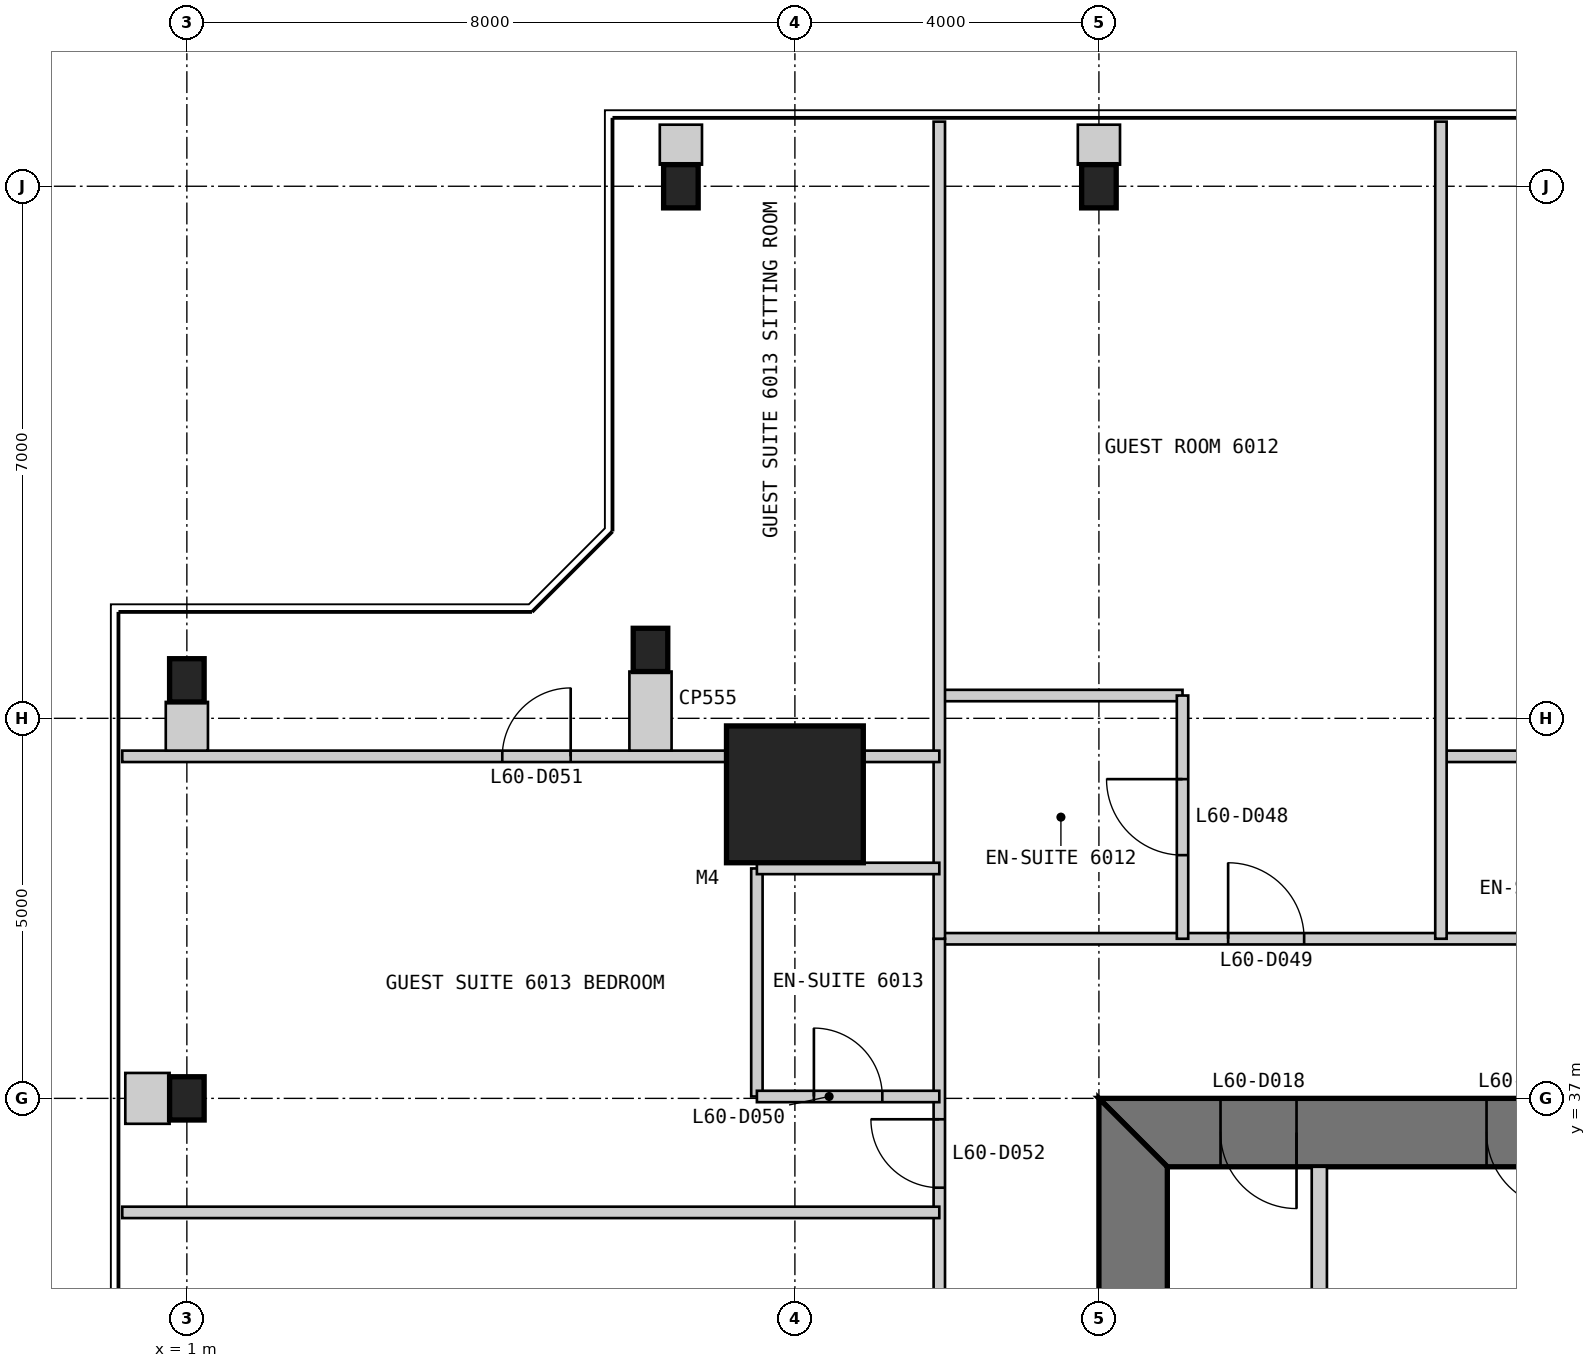
"""IFC4 building model, lengths in metres.
Left out: names, types, materials, properties, quantities, classifications, styles, units other than length and angle.
Written with IfcOpenShell. Run it as: python <this file> out.ifc"""

import sys

from ifc_helpers import new_model, si_unit, direction, frame, frame_2d, origin, origin_2d, place, context, subcontext, project, spatial, polyline, rectangle, i_section, outline, extrude, element, fill, save


model = new_model("IFC4")
c1 = context("Model", 3, precision=1e-05, world=origin(), true_north=direction((0.0, 1.0)))
c2 = subcontext(c1, "Body", "Model", "MODEL_VIEW")
j1 = project(units=[si_unit("LENGTHUNIT", "METRE"), si_unit("PLANEANGLEUNIT", "RADIAN")], contexts=[c1])
p1 = place(None, origin())
s1 = spatial("IfcSite", under=j1, at=p1, CompositionType="ELEMENT")
p2 = place(p1, origin())
s2 = spatial("IfcBuilding", under=s1, at=p2, CompositionType="ELEMENT")
p3 = place(p2, frame((0.0, 0.0, 256.0)))
s3 = spatial("IfcBuildingStorey", under=s2, at=p3, CompositionType="ELEMENT", Elevation=256.0)
p4 = place(p3, frame((9.0, 41.0, 0.0), z_axis=(0.0, 0.0, 1.0), x_axis=(1.0, 0.0, 0.0)))
e1 = element("IfcColumn", 1, at=p4, inside=s3, PredefinedType="COLUMN", context=c2, shape_type="SweptSolid", body=[
    extrude(rectangle(XDim=1.8, YDim=1.8, at=origin_2d()), origin(), (0.0, 0.0, 1.0), 3.4),
])
for number, where, z_axis, x_axis in (
    (2, (13.0, 49.0, 0.0), (0.0, 0.0, 1.0), (1.0, 0.0, 0.0)),
    (3, (7.5, 49.0, 0.0), (0.0, 0.0, 1.0), (1.0, 0.0, 0.0)),
    (4, (7.1, 42.9, 0.0), (0.0, 0.0, 1.0), (1.0, 0.0, 0.0)),
    (5, (1.0, 42.5, 0.0), (0.0, 0.0, 1.0), (1.0, 0.0, 0.0)),
    (6, (1.0, 37.0, 0.0), (0.0, 0.0, 1.0), (1.0, 0.0, 0.0)),
):
    element("IfcColumn", number, at=place(p3, frame(where, z_axis=z_axis, x_axis=x_axis)), inside=s3, PredefinedType="COLUMN", context=c2, shape_type="SweptSolid", body=[
        extrude(i_section(OverallWidth=0.455, OverallDepth=0.569, WebThickness=0.078, FlangeThickness=0.125, at=origin_2d()), origin(), (0.0, 0.0, 1.0), 3.4),
    ])
p5 = place(p3, frame((37.0, 36.55, 0.0), z_axis=(0.0, 0.0, 1.0), x_axis=(-1.0, 0.0, 0.0)))
e7 = element("IfcWall", 7, at=p5, inside=s3, PredefinedType="SHEAR", context=c2, shape_type="SweptSolid", body=[
    extrude(outline(polyline([(0.0, -0.45), (24.0, -0.45), (23.1, 0.45), (0.9, 0.45), (0.0, -0.45)])), origin(), (0.0, 0.0, 1.0), 3.4),
])
p6 = place(p5, frame((4.9, 0.0, 0.0)))
e8 = element("IfcOpeningElement", 8, at=p6, cuts=e7, PredefinedType="OPENING", context=c2, shape_type="SweptSolid", body=[
    extrude(rectangle(XDim=1.0, YDim=2.2, at=frame_2d((0.5, 1.1))), frame((0.0, 0.46, 0.0), z_axis=(0.0, -1.0, 0.0), x_axis=(1.0, 0.0, 0.0)), (0.0, 0.0, 1.0), 0.92),
])
p7 = place(p5, frame((8.9, 0.0, 0.0)))
e9 = element("IfcOpeningElement", 9, at=p7, cuts=e7, PredefinedType="OPENING", context=c2, shape_type="SweptSolid", body=[
    extrude(rectangle(XDim=1.1, YDim=2.2, at=frame_2d((0.55, 1.1))), frame((0.0, 0.46, 0.0), z_axis=(0.0, -1.0, 0.0), x_axis=(1.0, 0.0, 0.0)), (0.0, 0.0, 1.0), 0.92),
])
p8 = place(p5, frame((15.05, 0.0, 0.0)))
e10 = element("IfcOpeningElement", 10, at=p8, cuts=e7, PredefinedType="OPENING", context=c2, shape_type="SweptSolid", body=[
    extrude(rectangle(XDim=0.9, YDim=2.2, at=frame_2d((0.45, 1.1))), frame((0.0, 0.46, 0.0), z_axis=(0.0, -1.0, 0.0), x_axis=(1.0, 0.0, 0.0)), (0.0, 0.0, 1.0), 0.92),
])
p9 = place(p5, frame((17.9, 0.0, 0.0)))
e11 = element("IfcOpeningElement", 11, at=p9, cuts=e7, PredefinedType="OPENING", context=c2, shape_type="SweptSolid", body=[
    extrude(rectangle(XDim=1.0, YDim=2.2, at=frame_2d((0.5, 1.1))), frame((0.0, 0.46, 0.0), z_axis=(0.0, -1.0, 0.0), x_axis=(1.0, 0.0, 0.0)), (0.0, 0.0, 1.0), 0.92),
])
p10 = place(p5, frame((21.4, 0.0, 0.0)))
e12 = element("IfcOpeningElement", 12, at=p10, cuts=e7, PredefinedType="OPENING", context=c2, shape_type="SweptSolid", body=[
    extrude(rectangle(XDim=1.0, YDim=2.2, at=frame_2d((0.5, 1.1))), frame((0.0, 0.46, 0.0), z_axis=(0.0, -1.0, 0.0), x_axis=(1.0, 0.0, 0.0)), (0.0, 0.0, 1.0), 0.92),
])
p11 = place(p3, frame((13.45, 36.1, 0.0), z_axis=(0.0, 0.0, 1.0), x_axis=(0.0, -1.0, 0.0)))
e13 = element("IfcWall", 13, at=p11, inside=s3, PredefinedType="SHEAR", context=c2, shape_type="SweptSolid", body=[
    extrude(outline(polyline([(-0.9, -0.45), (23.1, -0.45), (22.2, 0.45), (0.0, 0.45), (-0.9, -0.45)])), origin(), (0.0, 0.0, 1.0), 3.4),
])
p12 = place(p11, frame((20.2, 0.0, 0.0)))
e14 = element("IfcOpeningElement", 14, at=p12, cuts=e13, PredefinedType="OPENING", context=c2, shape_type="SweptSolid", body=[
    extrude(rectangle(XDim=1.0, YDim=2.2, at=frame_2d((0.5, 1.1))), frame((0.0, 0.46, 0.0), z_axis=(0.0, -1.0, 0.0), x_axis=(1.0, 0.0, 0.0)), (0.0, 0.0, 1.0), 0.92),
])
p13 = place(p11, frame((17.25, 0.0, 0.0)))
e15 = element("IfcOpeningElement", 15, at=p13, cuts=e13, PredefinedType="OPENING", context=c2, shape_type="SweptSolid", body=[
    extrude(rectangle(XDim=0.9, YDim=2.2, at=frame_2d((0.45, 1.1))), frame((0.0, 0.46, 0.0), z_axis=(0.0, -1.0, 0.0), x_axis=(1.0, 0.0, 0.0)), (0.0, 0.0, 1.0), 0.92),
])
p14 = place(p3, frame((15.9, 36.1, 0.0), z_axis=(0.0, 0.0, 1.0), x_axis=(0.0, -1.0, 0.0)))
e16 = element("IfcWall", 16, at=p14, inside=s3, PredefinedType="PARTITIONING", context=c2, shape_type="SweptSolid", body=[
    extrude(rectangle(XDim=6.1, YDim=0.2, at=frame_2d((3.05, 0.0))), origin(), (0.0, 0.0, 1.0), 3.2),
])
p15 = place(p3, frame((39.1, 39.1, 0.0), z_axis=(0.0, 0.0, 1.0), x_axis=(-1.0, 0.0, 0.0)))
e17 = element("IfcWall", 17, at=p15, inside=s3, PredefinedType="PARTITIONING", context=c2, shape_type="SweptSolid", body=[
    extrude(rectangle(XDim=28.2, YDim=0.15, at=frame_2d((14.1, 0.0))), origin(), (0.0, 0.0, 1.0), 3.25),
])
p16 = place(p15, frame((2.375, 0.0, 0.0)))
e18 = element("IfcOpeningElement", 18, at=p16, cuts=e17, PredefinedType="OPENING", context=c2, shape_type="SweptSolid", body=[
    extrude(rectangle(XDim=0.9, YDim=2.1, at=frame_2d((0.45, 1.05))), frame((0.0, 0.085, 0.0), z_axis=(0.0, -1.0, 0.0), x_axis=(1.0, 0.0, 0.0)), (0.0, 0.0, 1.0), 0.17),
])
p17 = place(p15, frame((10.7, 0.0, 0.0)))
e19 = element("IfcOpeningElement", 19, at=p17, cuts=e17, PredefinedType="OPENING", context=c2, shape_type="SweptSolid", body=[
    extrude(rectangle(XDim=0.9, YDim=2.1, at=frame_2d((0.45, 1.05))), frame((0.0, 0.085, 0.0), z_axis=(0.0, -1.0, 0.0), x_axis=(1.0, 0.0, 0.0)), (0.0, 0.0, 1.0), 0.17),
])
p18 = place(p15, frame((17.1, 0.0, 0.0)))
e20 = element("IfcOpeningElement", 20, at=p18, cuts=e17, PredefinedType="OPENING", context=c2, shape_type="SweptSolid", body=[
    extrude(rectangle(XDim=0.9, YDim=2.1, at=frame_2d((0.45, 1.05))), frame((0.0, 0.085, 0.0), z_axis=(0.0, -1.0, 0.0), x_axis=(1.0, 0.0, 0.0)), (0.0, 0.0, 1.0), 0.17),
])
p19 = place(p15, frame((23.4, 0.0, 0.0)))
e21 = element("IfcOpeningElement", 21, at=p19, cuts=e17, PredefinedType="OPENING", context=c2, shape_type="SweptSolid", body=[
    extrude(rectangle(XDim=1.0, YDim=2.1, at=frame_2d((0.5, 1.05))), frame((0.0, 0.085, 0.0), z_axis=(0.0, -1.0, 0.0), x_axis=(1.0, 0.0, 0.0)), (0.0, 0.0, 1.0), 0.17),
])
p20 = place(p3, frame((20.5, 41.5, 0.0), z_axis=(0.0, 0.0, 1.0), x_axis=(-1.0, 0.0, 0.0)))
e22 = element("IfcWall", 22, at=p20, inside=s3, PredefinedType="PARTITIONING", context=c2, shape_type="SweptSolid", body=[
    extrude(rectangle(XDim=3.0, YDim=0.15, at=frame_2d((1.5, 0.0))), origin(), (0.0, 0.0, 1.0), 3.25),
])
p21 = place(p3, frame((17.5, 49.85, 0.0), z_axis=(0.0, 0.0, 1.0), x_axis=(0.0, -1.0, 0.0)))
e23 = element("IfcWall", 23, at=p21, inside=s3, PredefinedType="PARTITIONING", context=c2, shape_type="SweptSolid", body=[
    extrude(rectangle(XDim=10.75, YDim=0.15, at=frame_2d((5.375, 0.0))), origin(), (0.0, 0.0, 1.0), 3.25),
])
p22 = place(p3, frame((14.1, 42.3, 0.0), z_axis=(0.0, 0.0, 1.0), x_axis=(-1.0, 0.0, 0.0)))
e24 = element("IfcWall", 24, at=p22, inside=s3, PredefinedType="PARTITIONING", context=c2, shape_type="SweptSolid", body=[
    extrude(rectangle(XDim=3.2, YDim=0.15, at=frame_2d((1.6, 0.0))), origin(), (0.0, 0.0, 1.0), 3.25),
])
p23 = place(p3, frame((14.1, 42.3, 0.0), z_axis=(0.0, 0.0, 1.0), x_axis=(0.0, -1.0, 0.0)))
e25 = element("IfcWall", 25, at=p23, inside=s3, PredefinedType="PARTITIONING", context=c2, shape_type="SweptSolid", body=[
    extrude(rectangle(XDim=3.2, YDim=0.15, at=frame_2d((1.6, 0.0))), origin(), (0.0, 0.0, 1.0), 3.25),
])
p24 = place(p23, frame((1.1, 0.0, 0.0)))
e26 = element("IfcOpeningElement", 26, at=p24, cuts=e25, PredefinedType="OPENING", context=c2, shape_type="SweptSolid", body=[
    extrude(rectangle(XDim=1.0, YDim=2.1, at=frame_2d((0.5, 1.05))), frame((0.0, 0.085, 0.0), z_axis=(0.0, -1.0, 0.0), x_axis=(1.0, 0.0, 0.0)), (0.0, 0.0, 1.0), 0.17),
])
p25 = place(p3, frame((10.9, 39.1, 0.0), z_axis=(0.0, 0.0, 1.0), x_axis=(0.0, -1.0, 0.0)))
e27 = element("IfcWall", 27, at=p25, inside=s3, PredefinedType="PARTITIONING", context=c2, shape_type="SweptSolid", body=[
    extrude(rectangle(XDim=28.2, YDim=0.15, at=frame_2d((14.1, 0.0))), origin(), (0.0, 0.0, 1.0), 3.25),
])
p26 = place(p25, frame((2.375, 0.0, 0.0)))
e28 = element("IfcOpeningElement", 28, at=p26, cuts=e27, PredefinedType="OPENING", context=c2, shape_type="SweptSolid", body=[
    extrude(rectangle(XDim=0.9, YDim=2.1, at=frame_2d((0.45, 1.05))), frame((0.0, 0.085, 0.0), z_axis=(0.0, -1.0, 0.0), x_axis=(1.0, 0.0, 0.0)), (0.0, 0.0, 1.0), 0.17),
])
p27 = place(p25, frame((10.7, 0.0, 0.0)))
e29 = element("IfcOpeningElement", 29, at=p27, cuts=e27, PredefinedType="OPENING", context=c2, shape_type="SweptSolid", body=[
    extrude(rectangle(XDim=0.9, YDim=2.1, at=frame_2d((0.45, 1.05))), frame((0.0, 0.085, 0.0), z_axis=(0.0, -1.0, 0.0), x_axis=(1.0, 0.0, 0.0)), (0.0, 0.0, 1.0), 0.17),
])
p28 = place(p25, frame((17.1, 0.0, 0.0)))
e30 = element("IfcOpeningElement", 30, at=p28, cuts=e27, PredefinedType="OPENING", context=c2, shape_type="SweptSolid", body=[
    extrude(rectangle(XDim=0.9, YDim=2.1, at=frame_2d((0.45, 1.05))), frame((0.0, 0.085, 0.0), z_axis=(0.0, -1.0, 0.0), x_axis=(1.0, 0.0, 0.0)), (0.0, 0.0, 1.0), 0.17),
])
p29 = place(p25, frame((23.7, 0.0, 0.0)))
e31 = element("IfcOpeningElement", 31, at=p29, cuts=e27, PredefinedType="OPENING", context=c2, shape_type="SweptSolid", body=[
    extrude(rectangle(XDim=0.9, YDim=2.1, at=frame_2d((0.45, 1.05))), frame((0.0, 0.085, 0.0), z_axis=(0.0, -1.0, 0.0), x_axis=(1.0, 0.0, 0.0)), (0.0, 0.0, 1.0), 0.17),
])
p30 = place(p3, frame((10.9, 49.85, 0.0), z_axis=(0.0, 0.0, 1.0), x_axis=(0.0, -1.0, 0.0)))
e32 = element("IfcWall", 32, at=p30, inside=s3, PredefinedType="PARTITIONING", context=c2, shape_type="SweptSolid", body=[
    extrude(rectangle(XDim=10.75, YDim=0.15, at=frame_2d((5.375, 0.0))), origin(), (0.0, 0.0, 1.0), 3.25),
])
p31 = place(p3, frame((8.5, 40.025, 0.0), z_axis=(0.0, 0.0, 1.0), x_axis=(0.0, -1.0, 0.0)))
e33 = element("IfcWall", 33, at=p31, inside=s3, PredefinedType="PARTITIONING", context=c2, shape_type="SweptSolid", body=[
    extrude(rectangle(XDim=3.0, YDim=0.15, at=frame_2d((1.5, 0.0))), origin(), (0.0, 0.0, 1.0), 3.25),
])
p32 = place(p3, frame((8.5, 37.025, 0.0), z_axis=(0.0, 0.0, 1.0), x_axis=(1.0, 0.0, 0.0)))
e34 = element("IfcWall", 34, at=p32, inside=s3, PredefinedType="PARTITIONING", context=c2, shape_type="SweptSolid", body=[
    extrude(rectangle(XDim=2.4, YDim=0.15, at=frame_2d((1.2, 0.0))), origin(), (0.0, 0.0, 1.0), 2.404),
])
p33 = place(p32, frame((0.75, 0.0, 0.0)))
e35 = element("IfcOpeningElement", 35, at=p33, cuts=e34, PredefinedType="OPENING", context=c2, shape_type="SweptSolid", body=[
    extrude(rectangle(XDim=0.9, YDim=2.1, at=frame_2d((0.45, 1.05))), frame((0.0, 0.085, 0.0), z_axis=(0.0, -1.0, 0.0), x_axis=(1.0, 0.0, 0.0)), (0.0, 0.0, 1.0), 0.17),
])
p34 = place(p3, frame((8.5, 40.025, 0.0), z_axis=(0.0, 0.0, 1.0), x_axis=(1.0, 0.0, 0.0)))
e36 = element("IfcWall", 36, at=p34, inside=s3, PredefinedType="PARTITIONING", context=c2, shape_type="SweptSolid", body=[
    extrude(rectangle(XDim=2.4, YDim=0.15, at=frame_2d((1.2, 0.0))), origin(), (0.0, 0.0, 1.0), 3.25),
])
p35 = place(p3, frame((0.15, 41.5, 0.0), z_axis=(0.0, 0.0, 1.0), x_axis=(1.0, 0.0, 0.0)))
e37 = element("IfcWall", 37, at=p35, inside=s3, PredefinedType="PARTITIONING", context=c2, shape_type="SweptSolid", body=[
    extrude(rectangle(XDim=10.75, YDim=0.15, at=frame_2d((5.375, 0.0))), origin(), (0.0, 0.0, 1.0), 3.25),
])
p36 = place(p35, frame((5.0, 0.0, 0.0)))
e38 = element("IfcOpeningElement", 38, at=p36, cuts=e37, PredefinedType="OPENING", context=c2, shape_type="SweptSolid", body=[
    extrude(rectangle(XDim=0.9, YDim=2.1, at=frame_2d((0.45, 1.05))), frame((0.0, 0.085, 0.0), z_axis=(0.0, -1.0, 0.0), x_axis=(1.0, 0.0, 0.0)), (0.0, 0.0, 1.0), 0.17),
])
p37 = place(p3, frame((0.15, 35.5, 0.0), z_axis=(0.0, 0.0, 1.0), x_axis=(1.0, 0.0, 0.0)))
e39 = element("IfcWall", 39, at=p37, inside=s3, PredefinedType="PARTITIONING", context=c2, shape_type="SweptSolid", body=[
    extrude(rectangle(XDim=10.75, YDim=0.15, at=frame_2d((5.375, 0.0))), origin(), (0.0, 0.0, 1.0), 3.25),
])
for number, where, z_axis, x_axis in (
    (40, (13.0, 49.81, 0.0), (0.0, 0.0, 1.0), (0.0, -1.0, 0.0)),
    (41, (7.5, 49.81, 0.0), (0.0, 0.0, 1.0), (0.0, -1.0, 0.0)),
):
    element("IfcWall", number, at=place(p3, frame(where, z_axis=z_axis, x_axis=x_axis)), inside=s3, PredefinedType="PARTITIONING", context=c2, shape_type="SweptSolid", body=[
        extrude(rectangle(XDim=0.526, YDim=0.555, at=frame_2d((0.263, 0.0))), origin(), (0.0, 0.0, 1.0), 3.25),
    ])
p38 = place(p3, frame((7.1, 41.575, 0.0), z_axis=(0.0, 0.0, 1.0), x_axis=(0.0, 1.0, 0.0)))
e42 = element("IfcWall", 42, at=p38, inside=s3, PredefinedType="PARTITIONING", context=c2, shape_type="SweptSolid", body=[
    extrude(rectangle(XDim=1.041, YDim=0.555, at=frame_2d((0.52, 0.0))), origin(), (0.0, 0.0, 1.0), 3.25),
])
p39 = place(p3, frame((1.0, 41.575, 0.0), z_axis=(0.0, 0.0, 1.0), x_axis=(0.0, 1.0, 0.0)))
e43 = element("IfcWall", 43, at=p39, inside=s3, PredefinedType="PARTITIONING", context=c2, shape_type="SweptSolid", body=[
    extrude(rectangle(XDim=0.641, YDim=0.555, at=frame_2d((0.32, 0.0))), origin(), (0.0, 0.0, 1.0), 2.338),
])
p40 = place(p3, frame((0.19, 37.0, 0.0), z_axis=(0.0, 0.0, 1.0), x_axis=(1.0, 0.0, 0.0)))
e44 = element("IfcWall", 44, at=p40, inside=s3, PredefinedType="PARTITIONING", context=c2, shape_type="SweptSolid", body=[
    extrude(rectangle(XDim=0.583, YDim=0.669, at=frame_2d((0.292, 0.0))), origin(), (0.0, 0.0, 1.0), 3.25),
])
p41 = place(p9, origin())
e45 = element("IfcDoor", 45, at=p41, inside=s3, OperationType="SINGLE_SWING_LEFT", PredefinedType="DOOR", context=c2, shape_type="SweptSolid", body=[
    extrude(rectangle(XDim=1.0, YDim=2.2, at=frame_2d((0.5, 1.1))), frame((0.0, 0.025, 0.0), z_axis=(0.0, -1.0, 0.0), x_axis=(1.0, 0.0, 0.0)), (0.0, 0.0, 1.0), 0.05),
    extrude(outline(polyline([(0.0, 0.0), (0.04, 0.0), (0.04, 2.16), (0.96, 2.16), (0.96, 0.0), (1.0, 0.0), (1.0, 2.2), (0.0, 2.2), (0.0, 0.0)])), frame((0.0, 0.3, 0.0), z_axis=(0.0, -1.0, 0.0), x_axis=(1.0, 0.0, 0.0)), (0.0, 0.0, 1.0), 0.6),
])
fill(e11, e45)
p42 = place(p10, origin())
e46 = element("IfcDoor", 46, at=p42, inside=s3, OperationType="SINGLE_SWING_LEFT", PredefinedType="DOOR", context=c2, shape_type="SweptSolid", body=[
    extrude(rectangle(XDim=1.0, YDim=2.2, at=frame_2d((0.5, 1.1))), frame((0.0, 0.025, 0.0), z_axis=(0.0, -1.0, 0.0), x_axis=(1.0, 0.0, 0.0)), (0.0, 0.0, 1.0), 0.05),
    extrude(outline(polyline([(0.0, 0.0), (0.04, 0.0), (0.04, 2.16), (0.96, 2.16), (0.96, 0.0), (1.0, 0.0), (1.0, 2.2), (0.0, 2.2), (0.0, 0.0)])), frame((0.0, 0.3, 0.0), z_axis=(0.0, -1.0, 0.0), x_axis=(1.0, 0.0, 0.0)), (0.0, 0.0, 1.0), 0.6),
])
fill(e12, e46)
p43 = place(p24, frame((1.0, 0.0, 0.0), z_axis=(0.0, 0.0, 1.0), x_axis=(-1.0, 0.0, 0.0)))
e47 = element("IfcDoor", 47, at=p43, inside=s3, OperationType="SINGLE_SWING_RIGHT", PredefinedType="DOOR", context=c2, shape_type="SweptSolid", body=[
    extrude(rectangle(XDim=1.0, YDim=2.1, at=frame_2d((0.5, 1.05))), frame((0.0, 0.025, 0.0), z_axis=(0.0, -1.0, 0.0), x_axis=(1.0, 0.0, 0.0)), (0.0, 0.0, 1.0), 0.05),
])
fill(e26, e47)
p44 = place(p19, frame((1.0, 0.0, 0.0), z_axis=(0.0, 0.0, 1.0), x_axis=(-1.0, 0.0, 0.0)))
e48 = element("IfcDoor", 48, at=p44, inside=s3, OperationType="SINGLE_SWING_LEFT", PredefinedType="DOOR", context=c2, shape_type="SweptSolid", body=[
    extrude(rectangle(XDim=1.0, YDim=2.1, at=frame_2d((0.5, 1.05))), frame((0.0, 0.025, 0.0), z_axis=(0.0, -1.0, 0.0), x_axis=(1.0, 0.0, 0.0)), (0.0, 0.0, 1.0), 0.05),
])
fill(e21, e48)
p45 = place(p33, origin())
e49 = element("IfcDoor", 49, at=p45, inside=s3, OperationType="SINGLE_SWING_LEFT", PredefinedType="DOOR", context=c2, shape_type="SweptSolid", body=[
    extrude(rectangle(XDim=0.9, YDim=2.1, at=frame_2d((0.45, 1.05))), frame((0.0, 0.025, 0.0), z_axis=(0.0, -1.0, 0.0), x_axis=(1.0, 0.0, 0.0)), (0.0, 0.0, 1.0), 0.05),
])
fill(e35, e49)
p46 = place(p36, origin())
e50 = element("IfcDoor", 50, at=p46, inside=s3, OperationType="SINGLE_SWING_RIGHT", PredefinedType="DOOR", context=c2, shape_type="SweptSolid", body=[
    extrude(rectangle(XDim=0.9, YDim=2.1, at=frame_2d((0.45, 1.05))), frame((0.0, 0.025, 0.0), z_axis=(0.0, -1.0, 0.0), x_axis=(1.0, 0.0, 0.0)), (0.0, 0.0, 1.0), 0.05),
])
fill(e38, e50)
p47 = place(p26, frame((0.9, 0.0, 0.0), z_axis=(0.0, 0.0, 1.0), x_axis=(-1.0, 0.0, 0.0)))
e51 = element("IfcDoor", 51, at=p47, inside=s3, OperationType="SINGLE_SWING_RIGHT", PredefinedType="DOOR", context=c2, shape_type="SweptSolid", body=[
    extrude(rectangle(XDim=0.9, YDim=2.1, at=frame_2d((0.45, 1.05))), frame((0.0, 0.025, 0.0), z_axis=(0.0, -1.0, 0.0), x_axis=(1.0, 0.0, 0.0)), (0.0, 0.0, 1.0), 0.05),
])
fill(e28, e51)
save(model, sys.argv[1])
